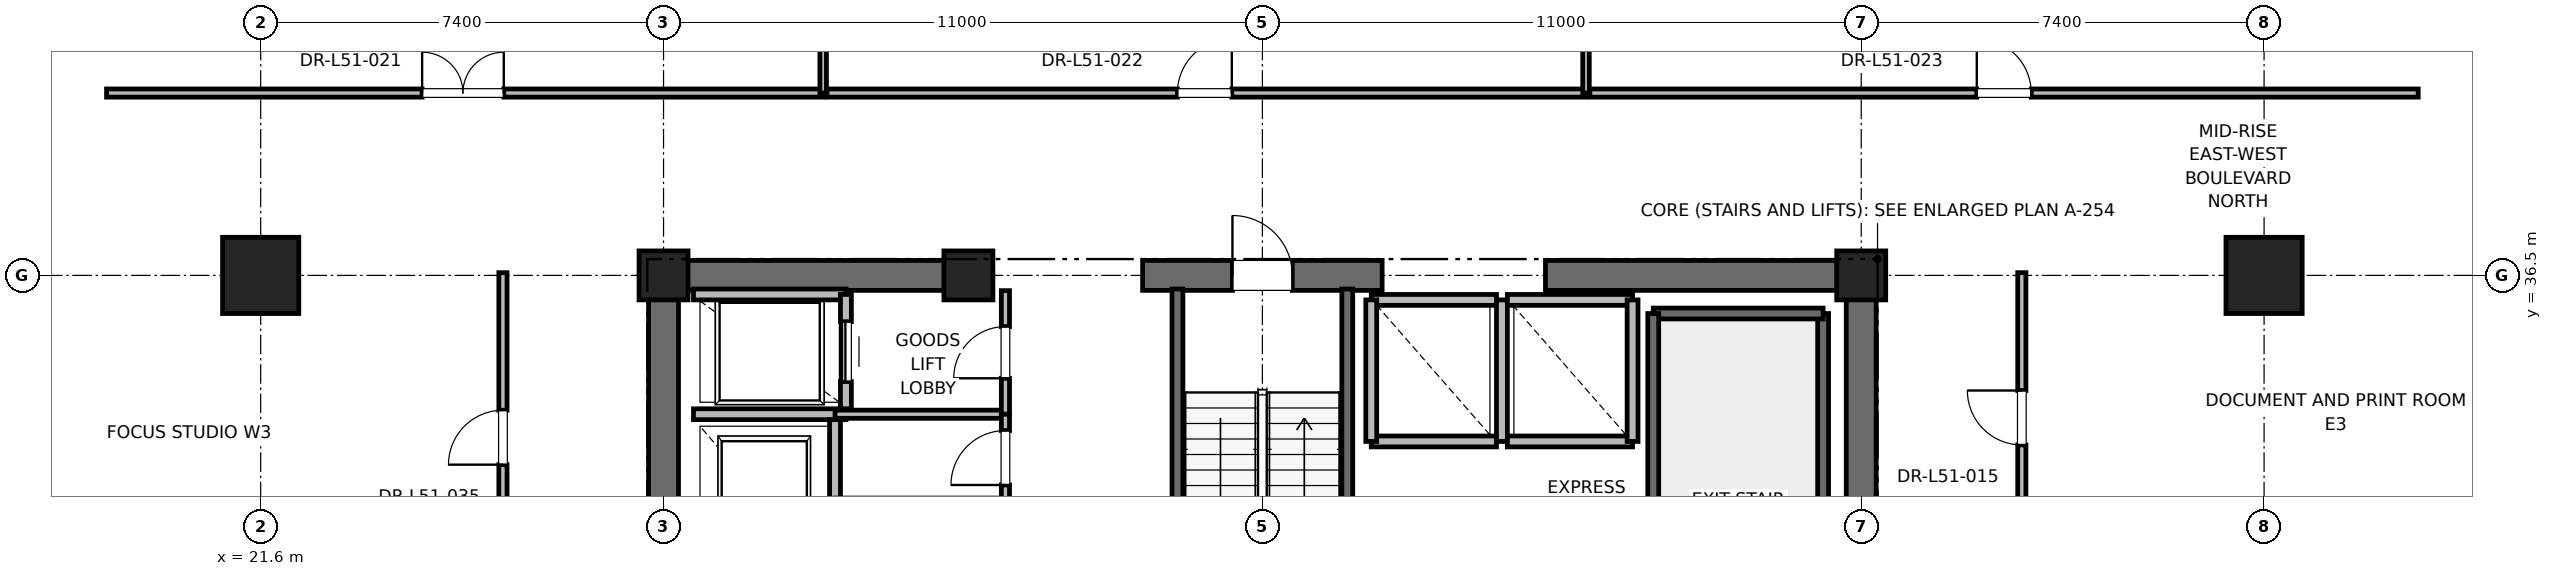
"""IFC4 building model, lengths in metres.
Left out: names, types, materials, properties, quantities, classifications, styles, units other than length and angle.
Written with IfcOpenShell. Run it as: python <this file> out.ifc"""

import sys

from ifc_helpers import new_model, si_unit, direction, frame, frame_2d, origin, origin_2d, place, context, subcontext, project, spatial, rectangle, extrude, element, fill, save


model = new_model("IFC4")
c1 = context("Model", 3, precision=1e-05, world=origin(), true_north=direction((0.0, 1.0)))
c2 = subcontext(c1, "Body", "Model", "MODEL_VIEW")
j1 = project(units=[si_unit("LENGTHUNIT", "METRE"), si_unit("PLANEANGLEUNIT", "RADIAN")], contexts=[c1])
p1 = place(None, origin())
s1 = spatial("IfcSite", under=j1, at=p1, CompositionType="ELEMENT")
p2 = place(p1, origin())
s2 = spatial("IfcBuilding", under=s1, at=p2, CompositionType="ELEMENT")
p3 = place(p2, frame((0.0, 0.0, 221.2)))
s3 = spatial("IfcBuildingStorey", under=s2, at=p3, CompositionType="ELEMENT", Elevation=221.2)
for number, where, z_axis, x_axis in (
    (1, (21.6, 36.5, 0.0), (0.0, 0.0, 1.0), (1.0, 0.0, 0.0)),
    (2, (58.4, 36.5, 0.0), (0.0, 0.0, 1.0), (1.0, 0.0, 0.0)),
):
    element("IfcColumn", number, at=place(p3, frame(where, z_axis=z_axis, x_axis=x_axis)), inside=s3, PredefinedType="COLUMN", context=c2, shape_type="SweptSolid", body=[
        extrude(rectangle(XDim=1.4, YDim=1.4, at=origin_2d()), origin(), (0.0, 0.0, 1.0), 4.0),
    ])
for number, where, z_axis, x_axis in (
    (3, (29.0, 36.5, 0.0), (0.0, 0.0, 1.0), (1.0, 0.0, 0.0)),
    (4, (51.0, 36.5, 0.0), (0.0, 0.0, 1.0), (1.0, 0.0, 0.0)),
    (5, (34.6, 36.5, 0.0), (0.0, 0.0, 1.0), (1.0, 0.0, 0.0)),
):
    element("IfcColumn", number, at=place(p3, frame(where, z_axis=z_axis, x_axis=x_axis)), inside=s3, PredefinedType="PILASTER", context=c2, shape_type="SweptSolid", body=[
        extrude(rectangle(XDim=0.9, YDim=0.9, at=origin_2d()), origin(), (0.0, 0.0, 1.0), 4.0),
    ])
p4 = place(p3, frame((29.0, 36.5, 0.0), z_axis=(0.0, 0.0, 1.0), x_axis=(1.0, 0.0, 0.0)))
e6 = element("IfcWall", 6, at=p4, inside=s3, PredefinedType="SHEAR", context=c2, shape_type="SweptSolid", body=[
    extrude(rectangle(XDim=5.8, YDim=0.55, at=frame_2d((2.9, 0.0))), origin(), (0.0, 0.0, 1.0), 3.775),
])
p5 = place(p3, frame((37.8, 36.5, 0.0), z_axis=(0.0, 0.0, 1.0), x_axis=(1.0, 0.0, 0.0)))
e7 = element("IfcWall", 7, at=p5, inside=s3, PredefinedType="SHEAR", context=c2, shape_type="SweptSolid", body=[
    extrude(rectangle(XDim=4.4, YDim=0.55, at=frame_2d((2.2, 0.0))), origin(), (0.0, 0.0, 1.0), 3.775),
])
p6 = place(p5, frame((1.65, 0.0, 0.0)))
e8 = element("IfcOpeningElement", 8, at=p6, cuts=e7, PredefinedType="OPENING", context=c2, shape_type="SweptSolid", body=[
    extrude(rectangle(XDim=1.1, YDim=2.15, at=frame_2d((0.55, 1.075))), frame((0.0, 0.275, 0.0), z_axis=(0.0, -1.0, 0.0), x_axis=(1.0, 0.0, 0.0)), (0.0, 0.0, 1.0), 0.55),
])
for number, where, z_axis, x_axis in (
    (9, (45.2, 36.5, 0.0), (0.0, 0.0, 1.0), (1.0, 0.0, 0.0)),
    (10, (29.0, 30.7, 0.0), (0.0, 0.0, 1.0), (0.0, 1.0, 0.0)),
):
    element("IfcWall", number, at=place(p3, frame(where, z_axis=z_axis, x_axis=x_axis)), inside=s3, PredefinedType="SHEAR", context=c2, shape_type="SweptSolid", body=[
        extrude(rectangle(XDim=5.8, YDim=0.55, at=frame_2d((2.9, 0.0))), origin(), (0.0, 0.0, 1.0), 3.775),
    ])
p7 = place(p3, frame((51.0, 27.7, 0.0), z_axis=(0.0, 0.0, 1.0), x_axis=(0.0, 1.0, 0.0)))
e11 = element("IfcWall", 11, at=p7, inside=s3, PredefinedType="SHEAR", context=c2, shape_type="SweptSolid", body=[
    extrude(rectangle(XDim=8.8, YDim=0.55, at=frame_2d((4.4, 0.0))), origin(), (0.0, 0.0, 1.0), 3.775),
])
p8 = place(p3, frame((50.3, 27.65, 0.0), z_axis=(0.0, 0.0, 1.0), x_axis=(0.0, 1.0, 0.0)))
e12 = element("IfcWall", 12, at=p8, inside=s3, PredefinedType="SOLIDWALL", context=c2, shape_type="SweptSolid", body=[
    extrude(rectangle(XDim=8.15, YDim=0.2, at=frame_2d((4.075, 0.0))), origin(), (0.0, 0.0, 1.0), 3.775),
])
p9 = place(p3, frame((47.18, 35.8, 0.0), z_axis=(0.0, 0.0, 1.0), x_axis=(1.0, 0.0, 0.0)))
e13 = element("IfcWall", 13, at=p9, inside=s3, PredefinedType="SOLIDWALL", context=c2, shape_type="SweptSolid", body=[
    extrude(rectangle(XDim=3.12, YDim=0.2, at=frame_2d((1.56, 0.0))), origin(), (0.0, 0.0, 1.0), 3.775),
])
p10 = place(p3, frame((47.18, 27.62, 0.0), z_axis=(0.0, 0.0, 1.0), x_axis=(0.0, 1.0, 0.0)))
e14 = element("IfcWall", 14, at=p10, inside=s3, PredefinedType="SOLIDWALL", context=c2, shape_type="SweptSolid", body=[
    extrude(rectangle(XDim=8.18, YDim=0.2, at=frame_2d((4.09, 0.0))), origin(), (0.0, 0.0, 1.0), 3.775),
])
p11 = place(p3, frame((38.44, 27.38, 0.0), z_axis=(0.0, 0.0, 1.0), x_axis=(0.0, 1.0, 0.0)))
e15 = element("IfcWall", 15, at=p11, inside=s3, PredefinedType="SOLIDWALL", context=c2, shape_type="SweptSolid", body=[
    extrude(rectangle(XDim=8.87, YDim=0.2, at=frame_2d((4.435, 0.0))), origin(), (0.0, 0.0, 1.0), 3.775),
])
p12 = place(p3, frame((41.56, 27.68, 0.0), z_axis=(0.0, 0.0, 1.0), x_axis=(0.0, 1.0, 0.0)))
e16 = element("IfcWall", 16, at=p12, inside=s3, PredefinedType="SOLIDWALL", context=c2, shape_type="SweptSolid", body=[
    extrude(rectangle(XDim=8.57, YDim=0.2, at=frame_2d((4.285, 0.0))), origin(), (0.0, 0.0, 1.0), 3.775),
])
p13 = place(p3, frame((29.55, 33.95, 0.0), z_axis=(0.0, 0.0, 1.0), x_axis=(1.0, 0.0, 0.0)))
e17 = element("IfcWall", 17, at=p13, inside=s3, PredefinedType="SOLIDWALL", context=c2, shape_type="SweptSolid", body=[
    extrude(rectangle(XDim=2.8, YDim=0.2, at=frame_2d((1.4, 0.0))), origin(), (0.0, 0.0, 1.0), 3.775),
])
p14 = place(p3, frame((32.15, 30.85, 0.0), z_axis=(0.0, 0.0, 1.0), x_axis=(0.0, 1.0, 0.0)))
e18 = element("IfcWall", 18, at=p14, inside=s3, PredefinedType="SOLIDWALL", context=c2, shape_type="SweptSolid", body=[
    extrude(rectangle(XDim=3.0, YDim=0.2, at=frame_2d((1.5, 0.0))), origin(), (0.0, 0.0, 1.0), 3.775),
])
p15 = place(p3, frame((32.35, 36.15, 0.0), z_axis=(0.0, 0.0, 1.0), x_axis=(-1.0, 0.0, 0.0)))
e19 = element("IfcWall", 19, at=p15, inside=s3, PredefinedType="SOLIDWALL", context=c2, shape_type="SweptSolid", body=[
    extrude(rectangle(XDim=2.8, YDim=0.2, at=frame_2d((1.4, 0.0))), origin(), (0.0, 0.0, 1.0), 3.062),
])
p16 = place(p3, frame((32.35, 34.05, 0.0), z_axis=(0.0, 0.0, 1.0), x_axis=(0.0, 1.0, 0.0)))
e20 = element("IfcWall", 20, at=p16, inside=s3, PredefinedType="SOLIDWALL", context=c2, shape_type="SweptSolid", body=[
    extrude(rectangle(XDim=2.1, YDim=0.2, at=frame_2d((1.05, 0.0))), origin(), (0.0, 0.0, 1.0), 3.775),
])
p17 = place(p16, frame((0.5, 0.0, 0.0)))
e21 = element("IfcOpeningElement", 21, at=p17, cuts=e20, PredefinedType="OPENING", context=c2, shape_type="SweptSolid", body=[
    extrude(rectangle(XDim=1.1, YDim=2.2, at=frame_2d((0.55, 1.1))), frame((0.0, 0.1, 0.0), z_axis=(0.0, -1.0, 0.0), x_axis=(1.0, 0.0, 0.0)), (0.0, 0.0, 1.0), 0.2),
])
p18 = place(p3, frame((42.0, 33.45, 0.0), z_axis=(0.0, 0.0, 1.0), x_axis=(1.0, 0.0, 0.0)))
e22 = element("IfcWall", 22, at=p18, inside=s3, PredefinedType="SOLIDWALL", context=c2, shape_type="SweptSolid", body=[
    extrude(rectangle(XDim=2.3, YDim=0.2, at=frame_2d((1.15, 0.0))), origin(), (0.0, 0.0, 1.0), 3.775),
])
p19 = place(p3, frame((44.3, 36.05, 0.0), z_axis=(0.0, 0.0, 1.0), x_axis=(-1.0, 0.0, 0.0)))
e23 = element("IfcWall", 23, at=p19, inside=s3, PredefinedType="SOLIDWALL", context=c2, shape_type="SweptSolid", body=[
    extrude(rectangle(XDim=2.3, YDim=0.2, at=frame_2d((1.15, 0.0))), origin(), (0.0, 0.0, 1.0), 2.755),
])
for number, where, z_axis, x_axis in (
    (24, (42.0, 36.05, 0.0), (0.0, 0.0, 1.0), (0.0, -1.0, 0.0)),
    (25, (44.4, 33.45, 0.0), (0.0, 0.0, 1.0), (0.0, 1.0, 0.0)),
):
    element("IfcWall", number, at=place(p3, frame(where, z_axis=z_axis, x_axis=x_axis)), inside=s3, PredefinedType="SOLIDWALL", context=c2, shape_type="SweptSolid", body=[
        extrude(rectangle(XDim=2.6, YDim=0.2, at=frame_2d((1.3, 0.0))), origin(), (0.0, 0.0, 1.0), 2.755),
    ])
p20 = place(p3, frame((44.5, 33.45, 0.0), z_axis=(0.0, 0.0, 1.0), x_axis=(1.0, 0.0, 0.0)))
e26 = element("IfcWall", 26, at=p20, inside=s3, PredefinedType="SOLIDWALL", context=c2, shape_type="SweptSolid", body=[
    extrude(rectangle(XDim=2.3, YDim=0.2, at=frame_2d((1.15, 0.0))), origin(), (0.0, 0.0, 1.0), 3.775),
])
p21 = place(p3, frame((46.8, 36.05, 0.0), z_axis=(0.0, 0.0, 1.0), x_axis=(-1.0, 0.0, 0.0)))
e27 = element("IfcWall", 27, at=p21, inside=s3, PredefinedType="SOLIDWALL", context=c2, shape_type="SweptSolid", body=[
    extrude(rectangle(XDim=2.3, YDim=0.2, at=frame_2d((1.15, 0.0))), origin(), (0.0, 0.0, 1.0), 2.755),
])
p22 = place(p3, frame((46.8, 33.45, 0.0), z_axis=(0.0, 0.0, 1.0), x_axis=(0.0, 1.0, 0.0)))
e28 = element("IfcWall", 28, at=p22, inside=s3, PredefinedType="SOLIDWALL", context=c2, shape_type="SweptSolid", body=[
    extrude(rectangle(XDim=2.6, YDim=0.2, at=frame_2d((1.3, 0.0))), origin(), (0.0, 0.0, 1.0), 3.775),
])
p23 = place(p3, frame((32.15, 33.95, 0.0), z_axis=(0.0, 0.0, 1.0), x_axis=(1.0, 0.0, 0.0)))
e29 = element("IfcWall", 29, at=p23, inside=s3, PredefinedType="PARTITIONING", context=c2, shape_type="SweptSolid", body=[
    extrude(rectangle(XDim=3.13, YDim=0.15, at=frame_2d((1.565, 0.0))), origin(), (0.0, 0.0, 1.0), 2.85),
])
p24 = place(p3, frame((35.28, 33.95, 0.0), z_axis=(0.0, 0.0, 1.0), x_axis=(0.0, 1.0, 0.0)))
e30 = element("IfcWall", 30, at=p24, inside=s3, PredefinedType="PARTITIONING", context=c2, shape_type="SweptSolid", body=[
    extrude(rectangle(XDim=2.27, YDim=0.15, at=frame_2d((1.135, 0.0))), origin(), (0.0, 0.0, 1.0), 2.755),
])
p25 = place(p24, frame((0.66, 0.0, 0.0)))
e31 = element("IfcOpeningElement", 31, at=p25, cuts=e30, PredefinedType="OPENING", context=c2, shape_type="SweptSolid", body=[
    extrude(rectangle(XDim=0.95, YDim=2.15, at=frame_2d((0.475, 1.075))), frame((0.0, 0.075, 0.0), z_axis=(0.0, -1.0, 0.0), x_axis=(1.0, 0.0, 0.0)), (0.0, 0.0, 1.0), 0.15),
])
p26 = place(p3, frame((35.28, 32.35, 0.0), z_axis=(0.0, 0.0, 1.0), x_axis=(0.0, 1.0, 0.0)))
e32 = element("IfcWall", 32, at=p26, inside=s3, PredefinedType="PARTITIONING", context=c2, shape_type="SweptSolid", body=[
    extrude(rectangle(XDim=1.6, YDim=0.15, at=frame_2d((0.8, 0.0))), origin(), (0.0, 0.0, 1.0), 2.85),
])
p27 = place(p26, frame((0.3, 0.0, 0.0)))
e33 = element("IfcOpeningElement", 33, at=p27, cuts=e32, PredefinedType="OPENING", context=c2, shape_type="SweptSolid", body=[
    extrude(rectangle(XDim=1.0, YDim=2.15, at=frame_2d((0.5, 1.075))), frame((0.0, 0.075, 0.0), z_axis=(0.0, -1.0, 0.0), x_axis=(1.0, 0.0, 0.0)), (0.0, 0.0, 1.0), 0.15),
])
p28 = place(p3, frame((18.769, 39.85, 0.0), z_axis=(0.0, 0.0, 1.0), x_axis=(1.0, 0.0, 0.0)))
e34 = element("IfcWall", 34, at=p28, inside=s3, PredefinedType="PARTITIONING", context=c2, shape_type="SweptSolid", body=[
    extrude(rectangle(XDim=13.163, YDim=0.15, at=frame_2d((6.582, 0.0))), origin(), (0.0, 0.0, 1.0), 2.85),
])
p29 = place(p28, frame((5.797, 0.0, 0.0)))
e35 = element("IfcOpeningElement", 35, at=p29, cuts=e34, PredefinedType="OPENING", context=c2, shape_type="SweptSolid", body=[
    extrude(rectangle(XDim=1.5, YDim=2.25, at=frame_2d((0.75, 1.125))), frame((0.0, 0.075, 0.0), z_axis=(0.0, -1.0, 0.0), x_axis=(1.0, 0.0, 0.0)), (0.0, 0.0, 1.0), 0.15),
])
p30 = place(p3, frame((31.932, 39.85, 0.0), z_axis=(0.0, 0.0, 1.0), x_axis=(0.0, 1.0, 0.0)))
e36 = element("IfcWall", 36, at=p30, inside=s3, PredefinedType="PARTITIONING", context=c2, shape_type="SweptSolid", body=[
    extrude(rectangle(XDim=9.69, YDim=0.12, at=frame_2d((4.845, 0.0))), origin(), (0.0, 0.0, 1.0), 2.405),
])
p31 = place(p3, frame((32.002, 39.85, 0.0), z_axis=(0.0, 0.0, 1.0), x_axis=(1.0, 0.0, 0.0)))
e37 = element("IfcWall", 37, at=p31, inside=s3, PredefinedType="PARTITIONING", context=c2, shape_type="SweptSolid", body=[
    extrude(rectangle(XDim=13.943, YDim=0.15, at=frame_2d((6.971, 0.0))), origin(), (0.0, 0.0, 1.0), 2.85),
])
p32 = place(p31, frame((6.436, 0.0, 0.0)))
e38 = element("IfcOpeningElement", 38, at=p32, cuts=e37, PredefinedType="OPENING", context=c2, shape_type="SweptSolid", body=[
    extrude(rectangle(XDim=1.0, YDim=2.15, at=frame_2d((0.5, 1.075))), frame((0.0, 0.075, 0.0), z_axis=(0.0, -1.0, 0.0), x_axis=(1.0, 0.0, 0.0)), (0.0, 0.0, 1.0), 0.15),
])
p33 = place(p3, frame((45.945, 39.85, 0.0), z_axis=(0.0, 0.0, 1.0), x_axis=(0.0, 1.0, 0.0)))
e39 = element("IfcWall", 39, at=p33, inside=s3, PredefinedType="PARTITIONING", context=c2, shape_type="SweptSolid", body=[
    extrude(rectangle(XDim=9.69, YDim=0.12, at=frame_2d((4.845, 0.0))), origin(), (0.0, 0.0, 1.0), 2.405),
])
p34 = place(p3, frame((46.015, 39.85, 0.0), z_axis=(0.0, 0.0, 1.0), x_axis=(1.0, 0.0, 0.0)))
e40 = element("IfcWall", 40, at=p34, inside=s3, PredefinedType="PARTITIONING", context=c2, shape_type="SweptSolid", body=[
    extrude(rectangle(XDim=15.216, YDim=0.15, at=frame_2d((7.608, 0.0))), origin(), (0.0, 0.0, 1.0), 2.85),
])
p35 = place(p34, frame((7.108, 0.0, 0.0)))
e41 = element("IfcOpeningElement", 41, at=p35, cuts=e40, PredefinedType="OPENING", context=c2, shape_type="SweptSolid", body=[
    extrude(rectangle(XDim=1.0, YDim=2.15, at=frame_2d((0.5, 1.075))), frame((0.0, 0.075, 0.0), z_axis=(0.0, -1.0, 0.0), x_axis=(1.0, 0.0, 0.0)), (0.0, 0.0, 1.0), 0.15),
])
p36 = place(p3, frame((26.05, 30.647, 0.0), z_axis=(0.0, 0.0, 1.0), x_axis=(0.0, 1.0, 0.0)))
e42 = element("IfcWall", 42, at=p36, inside=s3, PredefinedType="PARTITIONING", context=c2, shape_type="SweptSolid", body=[
    extrude(rectangle(XDim=5.903, YDim=0.15, at=frame_2d((2.952, 0.0))), origin(), (0.0, 0.0, 1.0), 2.85),
])
p37 = place(p36, frame((2.376, 0.0, 0.0)))
e43 = element("IfcOpeningElement", 43, at=p37, cuts=e42, PredefinedType="OPENING", context=c2, shape_type="SweptSolid", body=[
    extrude(rectangle(XDim=1.0, YDim=2.15, at=frame_2d((0.5, 1.075))), frame((0.0, 0.075, 0.0), z_axis=(0.0, -1.0, 0.0), x_axis=(1.0, 0.0, 0.0)), (0.0, 0.0, 1.0), 0.15),
])
p38 = place(p3, frame((53.95, 31.371, 0.0), z_axis=(0.0, 0.0, 1.0), x_axis=(0.0, 1.0, 0.0)))
e44 = element("IfcWall", 44, at=p38, inside=s3, PredefinedType="PARTITIONING", context=c2, shape_type="SweptSolid", body=[
    extrude(rectangle(XDim=5.179, YDim=0.15, at=frame_2d((2.589, 0.0))), origin(), (0.0, 0.0, 1.0), 2.85),
])
p39 = place(p38, frame((2.014, 0.0, 0.0)))
e45 = element("IfcOpeningElement", 45, at=p39, cuts=e44, PredefinedType="OPENING", context=c2, shape_type="SweptSolid", body=[
    extrude(rectangle(XDim=1.0, YDim=2.15, at=frame_2d((0.5, 1.075))), frame((0.0, 0.075, 0.0), z_axis=(0.0, -1.0, 0.0), x_axis=(1.0, 0.0, 0.0)), (0.0, 0.0, 1.0), 0.15),
])
p40 = place(p6, origin())
e46 = element("IfcDoor", 46, at=p40, inside=s3, OperationType="SINGLE_SWING_LEFT", PredefinedType="DOOR", context=c2, shape_type="SweptSolid", body=[
    extrude(rectangle(XDim=1.1, YDim=2.15, at=frame_2d((0.55, 1.075))), frame((0.0, 0.025, 0.0), z_axis=(0.0, -1.0, 0.0), x_axis=(1.0, 0.0, 0.0)), (0.0, 0.0, 1.0), 0.05),
])
fill(e8, e46)
p41 = place(p17, origin())
e47 = element("IfcDoor", 47, at=p41, inside=s3, OperationType="SLIDING_TO_RIGHT", PredefinedType="DOOR", context=c2, shape_type="SweptSolid", body=[
    extrude(rectangle(XDim=1.1, YDim=2.2, at=frame_2d((0.55, 1.1))), frame((0.0, 0.025, 0.0), z_axis=(0.0, -1.0, 0.0), x_axis=(1.0, 0.0, 0.0)), (0.0, 0.0, 1.0), 0.05),
])
fill(e21, e47)
p42 = place(p25, origin())
e48 = element("IfcDoor", 48, at=p42, inside=s3, OperationType="SINGLE_SWING_LEFT", PredefinedType="DOOR", context=c2, shape_type="SweptSolid", body=[
    extrude(rectangle(XDim=0.95, YDim=2.15, at=frame_2d((0.475, 1.075))), frame((0.0, 0.025, 0.0), z_axis=(0.0, -1.0, 0.0), x_axis=(1.0, 0.0, 0.0)), (0.0, 0.0, 1.0), 0.05),
])
fill(e31, e48)
p43 = place(p27, origin())
e49 = element("IfcDoor", 49, at=p43, inside=s3, OperationType="SINGLE_SWING_LEFT", PredefinedType="DOOR", context=c2, shape_type="SweptSolid", body=[
    extrude(rectangle(XDim=1.0, YDim=2.15, at=frame_2d((0.5, 1.075))), frame((0.0, 0.025, 0.0), z_axis=(0.0, -1.0, 0.0), x_axis=(1.0, 0.0, 0.0)), (0.0, 0.0, 1.0), 0.05),
])
fill(e33, e49)
p44 = place(p29, origin())
e50 = element("IfcDoor", 50, at=p44, inside=s3, OperationType="DOUBLE_DOOR_SINGLE_SWING", PredefinedType="DOOR", context=c2, shape_type="SweptSolid", body=[
    extrude(rectangle(XDim=1.5, YDim=2.25, at=frame_2d((0.75, 1.125))), frame((0.0, 0.025, 0.0), z_axis=(0.0, -1.0, 0.0), x_axis=(1.0, 0.0, 0.0)), (0.0, 0.0, 1.0), 0.05),
])
fill(e35, e50)
p45 = place(p32, origin())
e51 = element("IfcDoor", 51, at=p45, inside=s3, OperationType="SINGLE_SWING_RIGHT", PredefinedType="DOOR", context=c2, shape_type="SweptSolid", body=[
    extrude(rectangle(XDim=1.0, YDim=2.15, at=frame_2d((0.5, 1.075))), frame((0.0, 0.025, 0.0), z_axis=(0.0, -1.0, 0.0), x_axis=(1.0, 0.0, 0.0)), (0.0, 0.0, 1.0), 0.05),
])
fill(e38, e51)
p46 = place(p35, origin())
e52 = element("IfcDoor", 52, at=p46, inside=s3, OperationType="SINGLE_SWING_LEFT", PredefinedType="DOOR", context=c2, shape_type="SweptSolid", body=[
    extrude(rectangle(XDim=1.0, YDim=2.15, at=frame_2d((0.5, 1.075))), frame((0.0, 0.025, 0.0), z_axis=(0.0, -1.0, 0.0), x_axis=(1.0, 0.0, 0.0)), (0.0, 0.0, 1.0), 0.05),
])
fill(e41, e52)
p47 = place(p37, origin())
e53 = element("IfcDoor", 53, at=p47, inside=s3, OperationType="SINGLE_SWING_LEFT", PredefinedType="DOOR", context=c2, shape_type="SweptSolid", body=[
    extrude(rectangle(XDim=1.0, YDim=2.15, at=frame_2d((0.5, 1.075))), frame((0.0, 0.025, 0.0), z_axis=(0.0, -1.0, 0.0), x_axis=(1.0, 0.0, 0.0)), (0.0, 0.0, 1.0), 0.05),
])
fill(e43, e53)
p48 = place(p39, origin())
e54 = element("IfcDoor", 54, at=p48, inside=s3, OperationType="SINGLE_SWING_RIGHT", PredefinedType="DOOR", context=c2, shape_type="SweptSolid", body=[
    extrude(rectangle(XDim=1.0, YDim=2.15, at=frame_2d((0.5, 1.075))), frame((0.0, 0.025, 0.0), z_axis=(0.0, -1.0, 0.0), x_axis=(1.0, 0.0, 0.0)), (0.0, 0.0, 1.0), 0.05),
])
fill(e45, e54)
save(model, sys.argv[1])
